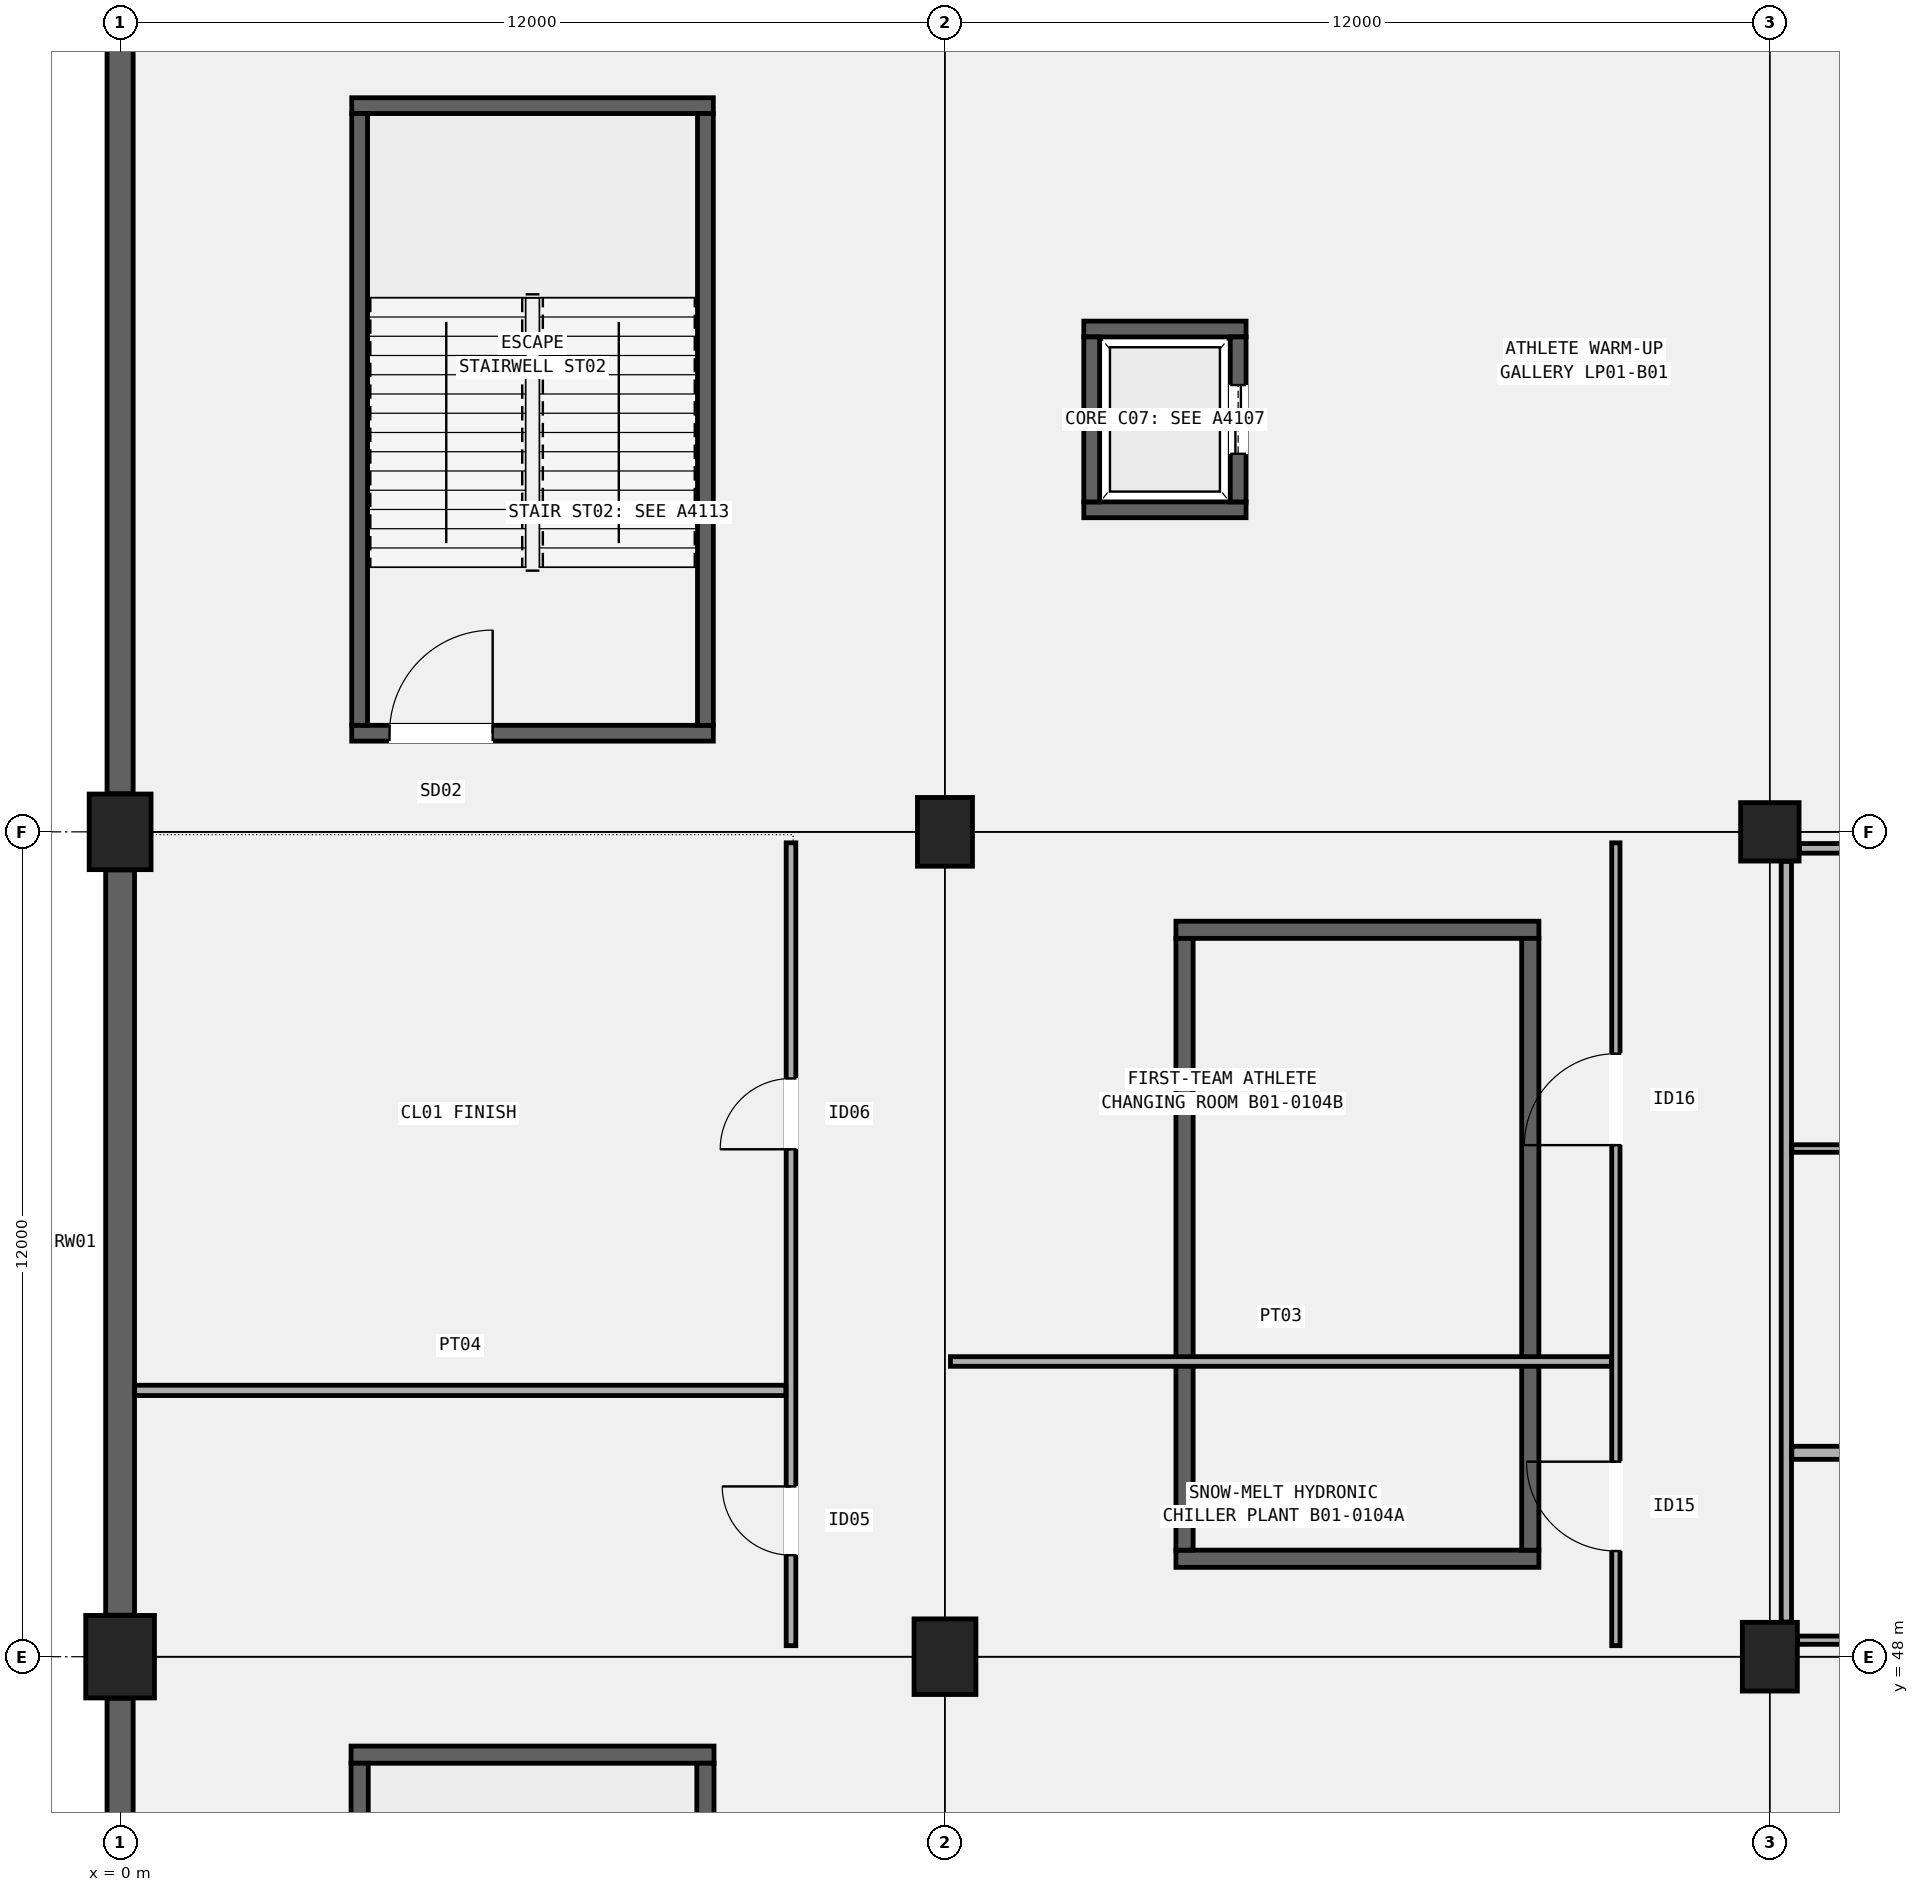
"""IFC4 building model, lengths in metres.
Left out: names, types, materials, properties, quantities, classifications, styles, units other than length and angle.
Written with IfcOpenShell. Run it as: python <this file> out.ifc"""

import sys

from ifc_helpers import new_model, si_unit, direction, frame, frame_2d, origin, origin_2d, place, context, subcontext, project, spatial, rectangle, circle, extrude, element, fill, save


model = new_model("IFC4")
c1 = context("Model", 3, precision=1e-05, world=origin(), true_north=direction((0.0, 1.0)))
c2 = subcontext(c1, "Body", "Model", "MODEL_VIEW")
j1 = project(units=[si_unit("LENGTHUNIT", "METRE"), si_unit("PLANEANGLEUNIT", "RADIAN")], contexts=[c1])
p1 = place(None, origin())
s1 = spatial("IfcSite", under=j1, at=p1, CompositionType="ELEMENT")
p2 = place(p1, origin())
s2 = spatial("IfcBuilding", under=s1, at=p2, CompositionType="ELEMENT")
p3 = place(p2, frame((0.0, 0.0, -4.8)))
s3 = spatial("IfcBuildingStorey", under=s2, at=p3, CompositionType="ELEMENT", Elevation=-4.8)
p4 = place(p3, frame((0.0, 48.0, 0.0), z_axis=(0.0, 0.0, 1.0), x_axis=(1.0, 0.0, 0.0)))
e1 = element("IfcColumn", 1, at=p4, inside=s3, PredefinedType="COLUMN", context=c2, shape_type="SweptSolid", body=[
    extrude(rectangle(XDim=1.0, YDim=1.2, at=origin_2d()), origin(), (0.0, 0.0, 1.0), 4.8),
])
for number, where, z_axis, x_axis in (
    (2, (0.0, 60.0, 0.0), (0.0, 0.0, 1.0), (1.0, 0.0, 0.0)),
    (3, (12.0, 48.0, 0.0), (0.0, 0.0, 1.0), (1.0, 0.0, 0.0)),
):
    element("IfcColumn", number, at=place(p3, frame(where, z_axis=z_axis, x_axis=x_axis)), inside=s3, PredefinedType="COLUMN", context=c2, shape_type="SweptSolid", body=[
        extrude(rectangle(XDim=0.9, YDim=1.1, at=origin_2d()), origin(), (0.0, 0.0, 1.0), 4.8),
    ])
for number, where, z_axis, x_axis in (
    (4, (12.0, 60.0, 0.0), (0.0, 0.0, 1.0), (1.0, 0.0, 0.0)),
    (5, (24.0, 48.0, 0.0), (0.0, 0.0, 1.0), (1.0, 0.0, 0.0)),
):
    element("IfcColumn", number, at=place(p3, frame(where, z_axis=z_axis, x_axis=x_axis)), inside=s3, PredefinedType="COLUMN", context=c2, shape_type="SweptSolid", body=[
        extrude(rectangle(XDim=0.8, YDim=1.0, at=origin_2d()), origin(), (0.0, 0.0, 1.0), 4.8),
    ])
p5 = place(p3, frame((24.0, 60.0, 0.0), z_axis=(0.0, 0.0, 1.0), x_axis=(1.0, 0.0, 0.0)))
e6 = element("IfcColumn", 6, at=p5, inside=s3, PredefinedType="COLUMN", context=c2, shape_type="SweptSolid", body=[
    extrude(circle(Radius=0.425, at=origin_2d()), origin(), (0.0, 0.0, 1.0), 4.8),
])
p6 = place(p3, frame((0.0, 36.429, 0.0), z_axis=(0.0, 0.0, 1.0), x_axis=(0.0, 1.0, 0.0)))
e7 = element("IfcWall", 7, at=p6, inside=s3, PredefinedType="STANDARD", context=c2, shape_type="SweptSolid", body=[
    extrude(rectangle(XDim=10.967, YDim=0.38, at=frame_2d((5.483, 0.0))), origin(), (0.0, 0.0, 1.0), 4.46),
])
p7 = place(p3, frame((0.0, 48.604, 0.0), z_axis=(0.0, 0.0, 1.0), x_axis=(0.0, 1.0, 0.0)))
e8 = element("IfcWall", 8, at=p7, inside=s3, PredefinedType="STANDARD", context=c2, shape_type="SweptSolid", body=[
    extrude(rectangle(XDim=10.842, YDim=0.42, at=frame_2d((5.421, 0.0))), origin(), (0.0, 0.0, 1.0), 4.46),
])
p8 = place(p3, frame((0.0, 60.554, 0.0), z_axis=(0.0, 0.0, 1.0), x_axis=(0.0, 1.0, 0.0)))
e9 = element("IfcWall", 9, at=p8, inside=s3, PredefinedType="STANDARD", context=c2, shape_type="SweptSolid", body=[
    extrude(rectangle(XDim=10.942, YDim=0.38, at=frame_2d((5.471, 0.0))), origin(), (0.0, 0.0, 1.0), 4.46),
])
p9 = place(p3, frame((3.36, 46.575, 0.0), z_axis=(0.0, 0.0, 1.0), x_axis=(1.0, 0.0, 0.0)))
e10 = element("IfcWall", 10, at=p9, inside=s3, PredefinedType="SHEAR", context=c2, shape_type="SweptSolid", body=[
    extrude(rectangle(XDim=5.28, YDim=0.25, at=frame_2d((2.64, 0.0))), origin(), (0.0, 0.0, 1.0), 4.5),
])
for number, where, z_axis, x_axis in (
    (11, (3.485, 37.55, 0.0), (0.0, 0.0, 1.0), (0.0, 1.0, 0.0)),
    (12, (8.515, 37.55, 0.0), (0.0, 0.0, 1.0), (0.0, 1.0, 0.0)),
):
    element("IfcWall", number, at=place(p3, frame(where, z_axis=z_axis, x_axis=x_axis)), inside=s3, PredefinedType="SHEAR", context=c2, shape_type="SweptSolid", body=[
        extrude(rectangle(XDim=8.9, YDim=0.25, at=frame_2d((4.45, 0.0))), origin(), (0.0, 0.0, 1.0), 4.5),
    ])
p10 = place(p3, frame((3.37, 61.435, 0.0), z_axis=(0.0, 0.0, 1.0), x_axis=(1.0, 0.0, 0.0)))
e13 = element("IfcWall", 13, at=p10, inside=s3, PredefinedType="SHEAR", context=c2, shape_type="SweptSolid", body=[
    extrude(rectangle(XDim=5.26, YDim=0.23, at=frame_2d((2.63, 0.0))), origin(), (0.0, 0.0, 1.0), 4.5),
])
p11 = place(p10, frame((0.55, 0.0, 0.0)))
e14 = element("IfcOpeningElement", 14, at=p11, cuts=e13, PredefinedType="OPENING", context=c2, shape_type="SweptSolid", body=[
    extrude(rectangle(XDim=1.5, YDim=2.2, at=frame_2d((0.75, 1.1))), frame((0.0, 0.125, 0.0), z_axis=(0.0, -1.0, 0.0), x_axis=(1.0, 0.0, 0.0)), (0.0, 0.0, 1.0), 0.25),
])
p12 = place(p3, frame((3.37, 70.565, 0.0), z_axis=(0.0, 0.0, 1.0), x_axis=(1.0, 0.0, 0.0)))
e15 = element("IfcWall", 15, at=p12, inside=s3, PredefinedType="SHEAR", context=c2, shape_type="SweptSolid", body=[
    extrude(rectangle(XDim=5.26, YDim=0.23, at=frame_2d((2.63, 0.0))), origin(), (0.0, 0.0, 1.0), 4.5),
])
for number, where, z_axis, x_axis in (
    (16, (3.485, 61.55, 0.0), (0.0, 0.0, 1.0), (0.0, 1.0, 0.0)),
    (17, (8.515, 61.55, 0.0), (0.0, 0.0, 1.0), (0.0, 1.0, 0.0)),
):
    element("IfcWall", number, at=place(p3, frame(where, z_axis=z_axis, x_axis=x_axis)), inside=s3, PredefinedType="SHEAR", context=c2, shape_type="SweptSolid", body=[
        extrude(rectangle(XDim=8.9, YDim=0.23, at=frame_2d((4.45, 0.0))), origin(), (0.0, 0.0, 1.0), 4.5),
    ])
for number, where, z_axis, x_axis in (
    (18, (15.36, 49.425, 0.0), (0.0, 0.0, 1.0), (1.0, 0.0, 0.0)),
    (19, (15.36, 58.575, 0.0), (0.0, 0.0, 1.0), (1.0, 0.0, 0.0)),
):
    element("IfcWall", number, at=place(p3, frame(where, z_axis=z_axis, x_axis=x_axis)), inside=s3, PredefinedType="SHEAR", context=c2, shape_type="SweptSolid", body=[
        extrude(rectangle(XDim=5.28, YDim=0.25, at=frame_2d((2.64, 0.0))), origin(), (0.0, 0.0, 1.0), 4.5),
    ])
for number, where, z_axis, x_axis in (
    (20, (15.485, 49.55, 0.0), (0.0, 0.0, 1.0), (0.0, 1.0, 0.0)),
    (21, (20.515, 49.55, 0.0), (0.0, 0.0, 1.0), (0.0, 1.0, 0.0)),
):
    element("IfcWall", number, at=place(p3, frame(where, z_axis=z_axis, x_axis=x_axis)), inside=s3, PredefinedType="SHEAR", context=c2, shape_type="SweptSolid", body=[
        extrude(rectangle(XDim=8.9, YDim=0.25, at=frame_2d((4.45, 0.0))), origin(), (0.0, 0.0, 1.0), 4.5),
    ])
for number, where, z_axis, x_axis in (
    (22, (14.02, 64.685, -0.65), (0.0, 0.0, 1.0), (1.0, 0.0, 0.0)),
    (23, (14.02, 67.315, -0.65), (0.0, 0.0, 1.0), (1.0, 0.0, 0.0)),
):
    element("IfcWall", number, at=place(p3, frame(where, z_axis=z_axis, x_axis=x_axis)), inside=s3, PredefinedType="SHEAR", context=c2, shape_type="SweptSolid", body=[
        extrude(rectangle(XDim=2.36, YDim=0.23, at=frame_2d((1.18, 0.0))), origin(), (0.0, 0.0, 1.0), 4.5),
    ])
p13 = place(p3, frame((14.135, 64.8, -0.65), z_axis=(0.0, 0.0, 1.0), x_axis=(0.0, 1.0, 0.0)))
e24 = element("IfcWall", 24, at=p13, inside=s3, PredefinedType="SHEAR", context=c2, shape_type="SweptSolid", body=[
    extrude(rectangle(XDim=2.4, YDim=0.23, at=frame_2d((1.2, 0.0))), origin(), (0.0, 0.0, 1.0), 4.5),
])
p14 = place(p3, frame((16.265, 64.8, -0.65), z_axis=(0.0, 0.0, 1.0), x_axis=(0.0, 1.0, 0.0)))
e25 = element("IfcWall", 25, at=p14, inside=s3, PredefinedType="SHEAR", context=c2, shape_type="SweptSolid", body=[
    extrude(rectangle(XDim=2.4, YDim=0.23, at=frame_2d((1.2, 0.0))), origin(), (0.0, 0.0, 1.0), 4.5),
])
p15 = place(p14, frame((0.7, 0.0, 0.65)))
e26 = element("IfcOpeningElement", 26, at=p15, cuts=e25, PredefinedType="OPENING", context=c2, shape_type="SweptSolid", body=[
    extrude(rectangle(XDim=1.0, YDim=2.15, at=frame_2d((0.5, 1.075))), frame((0.0, 0.125, 0.0), z_axis=(0.0, -1.0, 0.0), x_axis=(1.0, 0.0, 0.0)), (0.0, 0.0, 1.0), 0.25),
])
p16 = place(p3, frame((9.76, 48.16, 0.0), z_axis=(0.0, 0.0, 1.0), x_axis=(0.0, 1.0, 0.0)))
e27 = element("IfcWall", 27, at=p16, inside=s3, PredefinedType="PARTITIONING", context=c2, shape_type="SweptSolid", body=[
    extrude(rectangle(XDim=11.68, YDim=0.14, at=frame_2d((5.84, 0.0))), origin(), (0.0, 0.0, 1.0), 3.92),
])
p17 = place(p16, frame((1.317, 0.0, 0.0)))
e28 = element("IfcOpeningElement", 28, at=p17, cuts=e27, PredefinedType="OPENING", context=c2, shape_type="SweptSolid", body=[
    extrude(rectangle(XDim=1.0, YDim=2.14, at=frame_2d((0.5, 1.07))), frame((0.0, 0.08, 0.0), z_axis=(0.0, -1.0, 0.0), x_axis=(1.0, 0.0, 0.0)), (0.0, 0.0, 1.0), 0.16),
])
p18 = place(p16, frame((7.222, 0.0, 0.0)))
e29 = element("IfcOpeningElement", 29, at=p18, cuts=e27, PredefinedType="OPENING", context=c2, shape_type="SweptSolid", body=[
    extrude(rectangle(XDim=1.03, YDim=2.12, at=frame_2d((0.515, 1.06))), frame((0.0, 0.08, 0.0), z_axis=(0.0, -1.0, 0.0), x_axis=(1.0, 0.0, 0.0)), (0.0, 0.0, 1.0), 0.16),
])
p19 = place(p3, frame((0.212, 51.874, 0.0), z_axis=(0.0, 0.0, 1.0), x_axis=(1.0, 0.0, 0.0)))
e30 = element("IfcWall", 30, at=p19, inside=s3, PredefinedType="PARTITIONING", context=c2, shape_type="SweptSolid", body=[
    extrude(rectangle(XDim=9.473, YDim=0.15, at=frame_2d((4.737, 0.0))), origin(), (0.0, 0.0, 1.0), 3.92),
])
p20 = place(p3, frame((21.76, 48.16, 0.0), z_axis=(0.0, 0.0, 1.0), x_axis=(0.0, 1.0, 0.0)))
e31 = element("IfcWall", 31, at=p20, inside=s3, PredefinedType="PARTITIONING", context=c2, shape_type="SweptSolid", body=[
    extrude(rectangle(XDim=11.68, YDim=0.12, at=frame_2d((5.84, 0.0))), origin(), (0.0, 0.0, 1.0), 3.92),
])
p21 = place(p20, frame((1.377, 0.0, 0.0)))
e32 = element("IfcOpeningElement", 32, at=p21, cuts=e31, PredefinedType="OPENING", context=c2, shape_type="SweptSolid", body=[
    extrude(rectangle(XDim=1.3, YDim=2.24, at=frame_2d((0.65, 1.12))), frame((0.0, 0.07, 0.0), z_axis=(0.0, -1.0, 0.0), x_axis=(1.0, 0.0, 0.0)), (0.0, 0.0, 1.0), 0.14),
])
p22 = place(p20, frame((7.282, 0.0, 0.0)))
e33 = element("IfcOpeningElement", 33, at=p22, cuts=e31, PredefinedType="OPENING", context=c2, shape_type="SweptSolid", body=[
    extrude(rectangle(XDim=1.33, YDim=2.22, at=frame_2d((0.665, 1.11))), frame((0.0, 0.07, 0.0), z_axis=(0.0, -1.0, 0.0), x_axis=(1.0, 0.0, 0.0)), (0.0, 0.0, 1.0), 0.14),
])
p23 = place(p3, frame((12.08, 52.295, 0.0), z_axis=(0.0, 0.0, 1.0), x_axis=(1.0, 0.0, 0.0)))
e34 = element("IfcWall", 34, at=p23, inside=s3, PredefinedType="PARTITIONING", context=c2, shape_type="SweptSolid", body=[
    extrude(rectangle(XDim=9.615, YDim=0.14, at=frame_2d((4.808, 0.0))), origin(), (0.0, 0.0, 1.0), 3.92),
])
p24 = place(p3, frame((24.404, 48.24, 0.0), z_axis=(0.0, 0.0, 1.0), x_axis=(1.0, 0.0, 0.0)))
e35 = element("IfcWall", 35, at=p24, inside=s3, PredefinedType="PARTITIONING", context=c2, shape_type="SweptSolid", body=[
    extrude(rectangle(XDim=9.766, YDim=0.12, at=frame_2d((4.883, 0.0))), origin(), (0.0, 0.0, 1.0), 3.52),
])
p25 = place(p3, frame((24.429, 59.76, 0.0), z_axis=(0.0, 0.0, 1.0), x_axis=(1.0, 0.0, 0.0)))
e36 = element("IfcWall", 36, at=p25, inside=s3, PredefinedType="PARTITIONING", context=c2, shape_type="SweptSolid", body=[
    extrude(rectangle(XDim=9.741, YDim=0.14, at=frame_2d((4.871, 0.0))), origin(), (0.0, 0.0, 1.0), 3.62),
])
p26 = place(p3, frame((24.24, 48.504, 0.0), z_axis=(0.0, 0.0, 1.0), x_axis=(0.0, 1.0, 0.0)))
e37 = element("IfcWall", 37, at=p26, inside=s3, PredefinedType="PARTITIONING", context=c2, shape_type="SweptSolid", body=[
    extrude(rectangle(XDim=11.067, YDim=0.15, at=frame_2d((5.534, 0.0))), origin(), (0.0, 0.0, 1.0), 3.52),
])
p27 = place(p3, frame((24.32, 50.966, 0.0), z_axis=(0.0, 0.0, 1.0), x_axis=(1.0, 0.0, 0.0)))
e38 = element("IfcWall", 38, at=p27, inside=s3, PredefinedType="PARTITIONING", context=c2, shape_type="SweptSolid", body=[
    extrude(rectangle(XDim=9.85, YDim=0.19, at=frame_2d((4.925, 0.0))), origin(), (0.0, 0.0, 1.0), 3.92),
])
p28 = place(p3, frame((24.32, 55.393, 0.0), z_axis=(0.0, 0.0, 1.0), x_axis=(1.0, 0.0, 0.0)))
e39 = element("IfcWall", 39, at=p28, inside=s3, PredefinedType="PARTITIONING", context=c2, shape_type="SweptSolid", body=[
    extrude(rectangle(XDim=9.85, YDim=0.11, at=frame_2d((4.925, 0.0))), origin(), (0.0, 0.0, 1.0), 3.92),
])
p29 = place(p11, origin())
e40 = element("IfcDoor", 40, at=p29, inside=s3, OperationType="SINGLE_SWING_RIGHT", PredefinedType="DOOR", context=c2, shape_type="SweptSolid", body=[
    extrude(rectangle(XDim=1.5, YDim=2.2, at=frame_2d((0.75, 1.1))), frame((0.0, 0.025, 0.0), z_axis=(0.0, -1.0, 0.0), x_axis=(1.0, 0.0, 0.0)), (0.0, 0.0, 1.0), 0.05),
])
fill(e14, e40)
p30 = place(p15, origin())
e41 = element("IfcDoor", 41, at=p30, inside=s3, OperationType="DOUBLE_DOOR_SLIDING", PredefinedType="DOOR", context=c2, shape_type="SweptSolid", body=[
    extrude(rectangle(XDim=1.0, YDim=2.15, at=frame_2d((0.5, 1.075))), frame((0.0, 0.025, 0.0), z_axis=(0.0, -1.0, 0.0), x_axis=(1.0, 0.0, 0.0)), (0.0, 0.0, 1.0), 0.05),
])
fill(e26, e41)
p31 = place(p17, origin())
e42 = element("IfcDoor", 42, at=p31, inside=s3, OperationType="SINGLE_SWING_RIGHT", PredefinedType="DOOR", context=c2, shape_type="SweptSolid", body=[
    extrude(rectangle(XDim=1.0, YDim=2.14, at=frame_2d((0.5, 1.07))), frame((0.0, 0.025, 0.0), z_axis=(0.0, -1.0, 0.0), x_axis=(1.0, 0.0, 0.0)), (0.0, 0.0, 1.0), 0.05),
])
fill(e28, e42)
p32 = place(p18, origin())
e43 = element("IfcDoor", 43, at=p32, inside=s3, OperationType="SINGLE_SWING_LEFT", PredefinedType="DOOR", context=c2, shape_type="SweptSolid", body=[
    extrude(rectangle(XDim=1.03, YDim=2.12, at=frame_2d((0.515, 1.06))), frame((0.0, 0.025, 0.0), z_axis=(0.0, -1.0, 0.0), x_axis=(1.0, 0.0, 0.0)), (0.0, 0.0, 1.0), 0.05),
])
fill(e29, e43)
p33 = place(p21, origin())
e44 = element("IfcDoor", 44, at=p33, inside=s3, OperationType="SINGLE_SWING_RIGHT", PredefinedType="DOOR", context=c2, shape_type="SweptSolid", body=[
    extrude(rectangle(XDim=1.3, YDim=2.24, at=frame_2d((0.65, 1.12))), frame((0.0, 0.025, 0.0), z_axis=(0.0, -1.0, 0.0), x_axis=(1.0, 0.0, 0.0)), (0.0, 0.0, 1.0), 0.05),
])
fill(e32, e44)
p34 = place(p22, origin())
e45 = element("IfcDoor", 45, at=p34, inside=s3, OperationType="SINGLE_SWING_LEFT", PredefinedType="DOOR", context=c2, shape_type="SweptSolid", body=[
    extrude(rectangle(XDim=1.33, YDim=2.22, at=frame_2d((0.665, 1.11))), frame((0.0, 0.025, 0.0), z_axis=(0.0, -1.0, 0.0), x_axis=(1.0, 0.0, 0.0)), (0.0, 0.0, 1.0), 0.05),
])
fill(e33, e45)
save(model, sys.argv[1])
